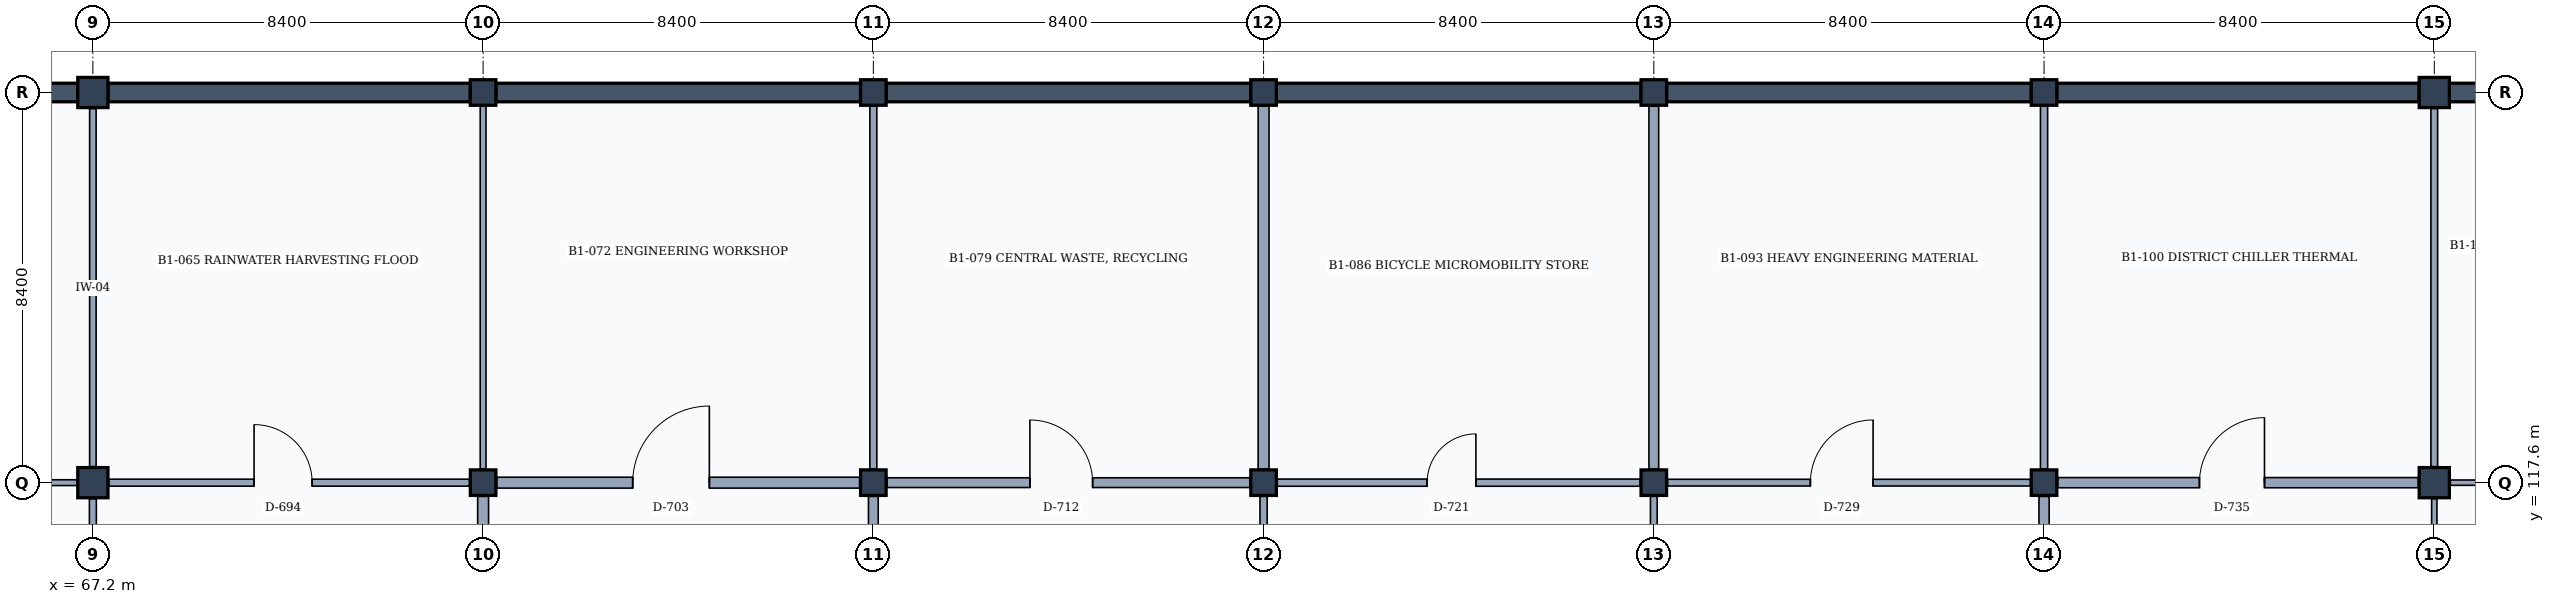
"""IFC4 building model, lengths in metres.
Left out: names, types, materials, properties, quantities, classifications, styles, units other than length and angle.
Written with IfcOpenShell. Run it as: python <this file> out.ifc"""

import sys

from ifc_helpers import new_model, si_unit, direction, frame, frame_2d, origin, origin_2d, place, context, subcontext, project, spatial, rectangle, extrude, element, fill, save


model = new_model("IFC4")
c1 = context("Model", 3, precision=1e-05, world=origin(), true_north=direction((0.0, 1.0)))
c2 = subcontext(c1, "Body", "Model", "MODEL_VIEW")
j1 = project(units=[si_unit("LENGTHUNIT", "METRE"), si_unit("PLANEANGLEUNIT", "RADIAN")], contexts=[c1])
p1 = place(None, origin())
s1 = spatial("IfcSite", under=j1, at=p1, CompositionType="ELEMENT")
p2 = place(p1, origin())
s2 = spatial("IfcBuilding", under=s1, at=p2, CompositionType="ELEMENT")
p3 = place(p2, frame((0.0, 0.0, -4.2)))
s3 = spatial("IfcBuildingStorey", under=s2, at=p3, CompositionType="ELEMENT", Elevation=-4.2)
for number, where, z_axis, x_axis in (
    (1, (67.2, 117.6, 0.0), (0.0, 0.0, 1.0), (1.0, 0.0, 0.0)),
    (2, (67.2, 126.0, 0.0), (0.0, 0.0, 1.0), (1.0, 0.0, 0.0)),
):
    element("IfcColumn", number, at=place(p3, frame(where, z_axis=z_axis, x_axis=x_axis)), inside=s3, PredefinedType="COLUMN", context=c2, shape_type="SweptSolid", body=[
        extrude(rectangle(XDim=0.65, YDim=0.65, at=origin_2d()), origin(), (0.0, 0.0, 1.0), 4.2),
    ])
for number, where, z_axis, x_axis in (
    (3, (75.6, 117.6, 0.0), (0.0, 0.0, 1.0), (1.0, 0.0, 0.0)),
    (4, (75.6, 126.0, 0.0), (0.0, 0.0, 1.0), (1.0, 0.0, 0.0)),
    (5, (84.0, 117.6, 0.0), (0.0, 0.0, 1.0), (1.0, 0.0, 0.0)),
    (6, (84.0, 126.0, 0.0), (0.0, 0.0, 1.0), (1.0, 0.0, 0.0)),
    (7, (92.4, 117.6, 0.0), (0.0, 0.0, 1.0), (1.0, 0.0, 0.0)),
    (8, (92.4, 126.0, 0.0), (0.0, 0.0, 1.0), (1.0, 0.0, 0.0)),
    (9, (100.8, 117.6, 0.0), (0.0, 0.0, 1.0), (1.0, 0.0, 0.0)),
    (10, (100.8, 126.0, 0.0), (0.0, 0.0, 1.0), (1.0, 0.0, 0.0)),
    (11, (109.2, 117.6, 0.0), (0.0, 0.0, 1.0), (1.0, 0.0, 0.0)),
    (12, (109.2, 126.0, 0.0), (0.0, 0.0, 1.0), (1.0, 0.0, 0.0)),
):
    element("IfcColumn", number, at=place(p3, frame(where, z_axis=z_axis, x_axis=x_axis)), inside=s3, PredefinedType="COLUMN", context=c2, shape_type="SweptSolid", body=[
        extrude(rectangle(XDim=0.55, YDim=0.55, at=origin_2d()), origin(), (0.0, 0.0, 1.0), 4.2),
    ])
for number, where, z_axis, x_axis in (
    (13, (117.6, 117.6, 0.0), (0.0, 0.0, 1.0), (1.0, 0.0, 0.0)),
    (14, (117.6, 126.0, 0.0), (0.0, 0.0, 1.0), (1.0, 0.0, 0.0)),
):
    element("IfcColumn", number, at=place(p3, frame(where, z_axis=z_axis, x_axis=x_axis)), inside=s3, PredefinedType="COLUMN", context=c2, shape_type="SweptSolid", body=[
        extrude(rectangle(XDim=0.65, YDim=0.65, at=origin_2d()), origin(), (0.0, 0.0, 1.0), 4.2),
    ])
p4 = place(p3, frame((59.125, 126.0, 0.0), z_axis=(0.0, 0.0, 1.0), x_axis=(1.0, 0.0, 0.0)))
e15 = element("IfcWall", 15, at=p4, inside=s3, PredefinedType="STANDARD", context=c2, shape_type="SweptSolid", body=[
    extrude(rectangle(XDim=7.75, YDim=0.4, at=frame_2d((3.875, 0.0))), origin(), (0.0, 0.0, 1.0), 3.88),
])
p5 = place(p3, frame((67.525, 126.0, 0.0), z_axis=(0.0, 0.0, 1.0), x_axis=(1.0, 0.0, 0.0)))
e16 = element("IfcWall", 16, at=p5, inside=s3, PredefinedType="STANDARD", context=c2, shape_type="SweptSolid", body=[
    extrude(rectangle(XDim=7.8, YDim=0.4, at=frame_2d((3.9, 0.0))), origin(), (0.0, 0.0, 1.0), 3.88),
])
for number, where, z_axis, x_axis in (
    (17, (75.875, 126.0, 0.0), (0.0, 0.0, 1.0), (1.0, 0.0, 0.0)),
    (18, (84.275, 126.0, 0.0), (0.0, 0.0, 1.0), (1.0, 0.0, 0.0)),
):
    element("IfcWall", number, at=place(p3, frame(where, z_axis=z_axis, x_axis=x_axis)), inside=s3, PredefinedType="STANDARD", context=c2, shape_type="SweptSolid", body=[
        extrude(rectangle(XDim=7.85, YDim=0.4, at=frame_2d((3.925, 0.0))), origin(), (0.0, 0.0, 1.0), 3.88),
    ])
p6 = place(p3, frame((92.675, 126.0, 0.0), z_axis=(0.0, 0.0, 1.0), x_axis=(1.0, 0.0, 0.0)))
e19 = element("IfcWall", 19, at=p6, inside=s3, PredefinedType="STANDARD", context=c2, shape_type="SweptSolid", body=[
    extrude(rectangle(XDim=7.85, YDim=0.4, at=frame_2d((3.925, 0.0))), origin(), (0.0, 0.0, 1.0), 3.88),
])
p7 = place(p3, frame((101.075, 126.0, 0.0), z_axis=(0.0, 0.0, 1.0), x_axis=(1.0, 0.0, 0.0)))
e20 = element("IfcWall", 20, at=p7, inside=s3, PredefinedType="STANDARD", context=c2, shape_type="SweptSolid", body=[
    extrude(rectangle(XDim=7.85, YDim=0.4, at=frame_2d((3.925, 0.0))), origin(), (0.0, 0.0, 1.0), 3.88),
])
p8 = place(p3, frame((109.475, 126.0, 0.0), z_axis=(0.0, 0.0, 1.0), x_axis=(1.0, 0.0, 0.0)))
e21 = element("IfcWall", 21, at=p8, inside=s3, PredefinedType="STANDARD", context=c2, shape_type="SweptSolid", body=[
    extrude(rectangle(XDim=7.8, YDim=0.4, at=frame_2d((3.9, 0.0))), origin(), (0.0, 0.0, 1.0), 3.88),
])
p9 = place(p3, frame((117.925, 126.0, 0.0), z_axis=(0.0, 0.0, 1.0), x_axis=(1.0, 0.0, 0.0)))
e22 = element("IfcWall", 22, at=p9, inside=s3, PredefinedType="STANDARD", context=c2, shape_type="SweptSolid", body=[
    extrude(rectangle(XDim=7.75, YDim=0.4, at=frame_2d((3.875, 0.0))), origin(), (0.0, 0.0, 1.0), 3.88),
])
p10 = place(p3, frame((67.2, 109.545, 0.0), z_axis=(0.0, 0.0, 1.0), x_axis=(0.0, 1.0, 0.0)))
e23 = element("IfcWall", 23, at=p10, inside=s3, PredefinedType="PARTITIONING", context=c2, shape_type="SweptSolid", body=[
    extrude(rectangle(XDim=7.71, YDim=0.15, at=frame_2d((3.855, 0.0))), origin(), (0.0, 0.0, 1.0), 3.23),
])
p11 = place(p3, frame((59.145, 117.6, 0.0), z_axis=(0.0, 0.0, 1.0), x_axis=(1.0, 0.0, 0.0)))
e24 = element("IfcWall", 24, at=p11, inside=s3, PredefinedType="PARTITIONING", context=c2, shape_type="SweptSolid", body=[
    extrude(rectangle(XDim=7.71, YDim=0.125, at=frame_2d((3.855, 0.0))), origin(), (0.0, 0.0, 1.0), 2.93),
])
p12 = place(p11, frame((3.0, 0.0, 0.0)))
e25 = element("IfcOpeningElement", 25, at=p12, cuts=e24, PredefinedType="OPENING", context=c2, shape_type="SweptSolid", body=[
    extrude(rectangle(XDim=1.5, YDim=2.3, at=frame_2d((0.75, 1.15))), frame((0.0, 0.073, 0.0), z_axis=(0.0, -1.0, 0.0), x_axis=(1.0, 0.0, 0.0)), (0.0, 0.0, 1.0), 0.145),
])
p13 = place(p3, frame((67.2, 117.945, 0.0), z_axis=(0.0, 0.0, 1.0), x_axis=(0.0, 1.0, 0.0)))
e26 = element("IfcWall", 26, at=p13, inside=s3, PredefinedType="PARTITIONING", context=c2, shape_type="SweptSolid", body=[
    extrude(rectangle(XDim=7.71, YDim=0.14, at=frame_2d((3.855, 0.0))), origin(), (0.0, 0.0, 1.0), 3.23),
])
p14 = place(p3, frame((75.6, 109.495, 0.0), z_axis=(0.0, 0.0, 1.0), x_axis=(0.0, 1.0, 0.0)))
e27 = element("IfcWall", 27, at=p14, inside=s3, PredefinedType="PARTITIONING", context=c2, shape_type="SweptSolid", body=[
    extrude(rectangle(XDim=7.81, YDim=0.235, at=frame_2d((3.905, 0.0))), origin(), (0.0, 0.0, 1.0), 3.23),
])
p15 = place(p3, frame((67.545, 117.6, 0.0), z_axis=(0.0, 0.0, 1.0), x_axis=(1.0, 0.0, 0.0)))
e28 = element("IfcWall", 28, at=p15, inside=s3, PredefinedType="PARTITIONING", context=c2, shape_type="SweptSolid", body=[
    extrude(rectangle(XDim=7.76, YDim=0.15, at=frame_2d((3.88, 0.0))), origin(), (0.0, 0.0, 1.0), 2.93),
])
p16 = place(p15, frame((3.125, 0.0, 0.0)))
e29 = element("IfcOpeningElement", 29, at=p16, cuts=e28, PredefinedType="OPENING", context=c2, shape_type="SweptSolid", body=[
    extrude(rectangle(XDim=1.25, YDim=2.3, at=frame_2d((0.625, 1.15))), frame((0.0, 0.085, 0.0), z_axis=(0.0, -1.0, 0.0), x_axis=(1.0, 0.0, 0.0)), (0.0, 0.0, 1.0), 0.17),
])
p17 = place(p3, frame((75.6, 117.895, 0.0), z_axis=(0.0, 0.0, 1.0), x_axis=(0.0, 1.0, 0.0)))
e30 = element("IfcWall", 30, at=p17, inside=s3, PredefinedType="PARTITIONING", context=c2, shape_type="SweptSolid", body=[
    extrude(rectangle(XDim=7.81, YDim=0.125, at=frame_2d((3.905, 0.0))), origin(), (0.0, 0.0, 1.0), 3.23),
])
p18 = place(p3, frame((84.0, 109.495, 0.0), z_axis=(0.0, 0.0, 1.0), x_axis=(0.0, 1.0, 0.0)))
e31 = element("IfcWall", 31, at=p18, inside=s3, PredefinedType="PARTITIONING", context=c2, shape_type="SweptSolid", body=[
    extrude(rectangle(XDim=7.81, YDim=0.21, at=frame_2d((3.905, 0.0))), origin(), (0.0, 0.0, 1.0), 3.23),
])
p19 = place(p3, frame((75.895, 117.6, 0.0), z_axis=(0.0, 0.0, 1.0), x_axis=(1.0, 0.0, 0.0)))
e32 = element("IfcWall", 32, at=p19, inside=s3, PredefinedType="PARTITIONING", context=c2, shape_type="SweptSolid", body=[
    extrude(rectangle(XDim=7.81, YDim=0.235, at=frame_2d((3.905, 0.0))), origin(), (0.0, 0.0, 1.0), 2.93),
])
p20 = place(p19, frame((2.925, 0.0, 0.0)))
e33 = element("IfcOpeningElement", 33, at=p20, cuts=e32, PredefinedType="OPENING", context=c2, shape_type="SweptSolid", body=[
    extrude(rectangle(XDim=1.65, YDim=2.25, at=frame_2d((0.825, 1.125))), frame((0.0, 0.127, 0.0), z_axis=(0.0, -1.0, 0.0), x_axis=(1.0, 0.0, 0.0)), (0.0, 0.0, 1.0), 0.255),
])
p21 = place(p3, frame((84.0, 117.895, 0.0), z_axis=(0.0, 0.0, 1.0), x_axis=(0.0, 1.0, 0.0)))
e34 = element("IfcWall", 34, at=p21, inside=s3, PredefinedType="PARTITIONING", context=c2, shape_type="SweptSolid", body=[
    extrude(rectangle(XDim=7.81, YDim=0.15, at=frame_2d((3.905, 0.0))), origin(), (0.0, 0.0, 1.0), 3.23),
])
p22 = place(p3, frame((92.4, 109.495, 0.0), z_axis=(0.0, 0.0, 1.0), x_axis=(0.0, 1.0, 0.0)))
e35 = element("IfcWall", 35, at=p22, inside=s3, PredefinedType="PARTITIONING", context=c2, shape_type="SweptSolid", body=[
    extrude(rectangle(XDim=7.81, YDim=0.155, at=frame_2d((3.905, 0.0))), origin(), (0.0, 0.0, 1.0), 3.23),
])
p23 = place(p3, frame((84.295, 117.6, 0.0), z_axis=(0.0, 0.0, 1.0), x_axis=(1.0, 0.0, 0.0)))
e36 = element("IfcWall", 36, at=p23, inside=s3, PredefinedType="PARTITIONING", context=c2, shape_type="SweptSolid", body=[
    extrude(rectangle(XDim=7.81, YDim=0.21, at=frame_2d((3.905, 0.0))), origin(), (0.0, 0.0, 1.0), 2.93),
])
p24 = place(p23, frame((3.075, 0.0, 0.0)))
e37 = element("IfcOpeningElement", 37, at=p24, cuts=e36, PredefinedType="OPENING", context=c2, shape_type="SweptSolid", body=[
    extrude(rectangle(XDim=1.35, YDim=2.25, at=frame_2d((0.675, 1.125))), frame((0.0, 0.115, 0.0), z_axis=(0.0, -1.0, 0.0), x_axis=(1.0, 0.0, 0.0)), (0.0, 0.0, 1.0), 0.23),
])
p25 = place(p3, frame((92.4, 117.895, 0.0), z_axis=(0.0, 0.0, 1.0), x_axis=(0.0, 1.0, 0.0)))
e38 = element("IfcWall", 38, at=p25, inside=s3, PredefinedType="PARTITIONING", context=c2, shape_type="SweptSolid", body=[
    extrude(rectangle(XDim=7.81, YDim=0.235, at=frame_2d((3.905, 0.0))), origin(), (0.0, 0.0, 1.0), 3.23),
])
p26 = place(p3, frame((100.8, 109.495, 0.0), z_axis=(0.0, 0.0, 1.0), x_axis=(0.0, 1.0, 0.0)))
e39 = element("IfcWall", 39, at=p26, inside=s3, PredefinedType="PARTITIONING", context=c2, shape_type="SweptSolid", body=[
    extrude(rectangle(XDim=7.81, YDim=0.145, at=frame_2d((3.905, 0.0))), origin(), (0.0, 0.0, 1.0), 3.23),
])
p27 = place(p3, frame((92.695, 117.6, 0.0), z_axis=(0.0, 0.0, 1.0), x_axis=(1.0, 0.0, 0.0)))
e40 = element("IfcWall", 40, at=p27, inside=s3, PredefinedType="PARTITIONING", context=c2, shape_type="SweptSolid", body=[
    extrude(rectangle(XDim=7.81, YDim=0.155, at=frame_2d((3.905, 0.0))), origin(), (0.0, 0.0, 1.0), 2.93),
])
p28 = place(p27, frame((3.225, 0.0, 0.0)))
e41 = element("IfcOpeningElement", 41, at=p28, cuts=e40, PredefinedType="OPENING", context=c2, shape_type="SweptSolid", body=[
    extrude(rectangle(XDim=1.05, YDim=2.2, at=frame_2d((0.525, 1.1))), frame((0.0, 0.087, 0.0), z_axis=(0.0, -1.0, 0.0), x_axis=(1.0, 0.0, 0.0)), (0.0, 0.0, 1.0), 0.175),
])
p29 = place(p3, frame((100.8, 117.895, 0.0), z_axis=(0.0, 0.0, 1.0), x_axis=(0.0, 1.0, 0.0)))
e42 = element("IfcWall", 42, at=p29, inside=s3, PredefinedType="PARTITIONING", context=c2, shape_type="SweptSolid", body=[
    extrude(rectangle(XDim=7.81, YDim=0.21, at=frame_2d((3.905, 0.0))), origin(), (0.0, 0.0, 1.0), 3.23),
])
p30 = place(p3, frame((109.2, 109.495, 0.0), z_axis=(0.0, 0.0, 1.0), x_axis=(0.0, 1.0, 0.0)))
e43 = element("IfcWall", 43, at=p30, inside=s3, PredefinedType="PARTITIONING", context=c2, shape_type="SweptSolid", body=[
    extrude(rectangle(XDim=7.81, YDim=0.22, at=frame_2d((3.905, 0.0))), origin(), (0.0, 0.0, 1.0), 3.23),
])
p31 = place(p3, frame((101.095, 117.6, 0.0), z_axis=(0.0, 0.0, 1.0), x_axis=(1.0, 0.0, 0.0)))
e44 = element("IfcWall", 44, at=p31, inside=s3, PredefinedType="PARTITIONING", context=c2, shape_type="SweptSolid", body=[
    extrude(rectangle(XDim=7.81, YDim=0.145, at=frame_2d((3.905, 0.0))), origin(), (0.0, 0.0, 1.0), 2.93),
])
p32 = place(p31, frame((3.075, 0.0, 0.0)))
e45 = element("IfcOpeningElement", 45, at=p32, cuts=e44, PredefinedType="OPENING", context=c2, shape_type="SweptSolid", body=[
    extrude(rectangle(XDim=1.35, YDim=2.25, at=frame_2d((0.675, 1.125))), frame((0.0, 0.083, 0.0), z_axis=(0.0, -1.0, 0.0), x_axis=(1.0, 0.0, 0.0)), (0.0, 0.0, 1.0), 0.165),
])
p33 = place(p3, frame((109.2, 117.895, 0.0), z_axis=(0.0, 0.0, 1.0), x_axis=(0.0, 1.0, 0.0)))
e46 = element("IfcWall", 46, at=p33, inside=s3, PredefinedType="PARTITIONING", context=c2, shape_type="SweptSolid", body=[
    extrude(rectangle(XDim=7.81, YDim=0.155, at=frame_2d((3.905, 0.0))), origin(), (0.0, 0.0, 1.0), 3.23),
])
p34 = place(p3, frame((117.6, 109.545, 0.0), z_axis=(0.0, 0.0, 1.0), x_axis=(0.0, 1.0, 0.0)))
e47 = element("IfcWall", 47, at=p34, inside=s3, PredefinedType="PARTITIONING", context=c2, shape_type="SweptSolid", body=[
    extrude(rectangle(XDim=7.71, YDim=0.115, at=frame_2d((3.855, 0.0))), origin(), (0.0, 0.0, 1.0), 3.23),
])
p35 = place(p3, frame((109.495, 117.6, 0.0), z_axis=(0.0, 0.0, 1.0), x_axis=(1.0, 0.0, 0.0)))
e48 = element("IfcWall", 48, at=p35, inside=s3, PredefinedType="PARTITIONING", context=c2, shape_type="SweptSolid", body=[
    extrude(rectangle(XDim=7.76, YDim=0.22, at=frame_2d((3.88, 0.0))), origin(), (0.0, 0.0, 1.0), 2.93),
])
p36 = place(p35, frame((3.05, 0.0, 0.0)))
e49 = element("IfcOpeningElement", 49, at=p36, cuts=e48, PredefinedType="OPENING", context=c2, shape_type="SweptSolid", body=[
    extrude(rectangle(XDim=1.4, YDim=2.25, at=frame_2d((0.7, 1.125))), frame((0.0, 0.12, 0.0), z_axis=(0.0, -1.0, 0.0), x_axis=(1.0, 0.0, 0.0)), (0.0, 0.0, 1.0), 0.24),
])
p37 = place(p3, frame((117.6, 117.945, 0.0), z_axis=(0.0, 0.0, 1.0), x_axis=(0.0, 1.0, 0.0)))
e50 = element("IfcWall", 50, at=p37, inside=s3, PredefinedType="PARTITIONING", context=c2, shape_type="SweptSolid", body=[
    extrude(rectangle(XDim=7.71, YDim=0.145, at=frame_2d((3.855, 0.0))), origin(), (0.0, 0.0, 1.0), 3.23),
])
p38 = place(p3, frame((117.945, 117.6, 0.0), z_axis=(0.0, 0.0, 1.0), x_axis=(1.0, 0.0, 0.0)))
e51 = element("IfcWall", 51, at=p38, inside=s3, PredefinedType="PARTITIONING", context=c2, shape_type="SweptSolid", body=[
    extrude(rectangle(XDim=7.71, YDim=0.115, at=frame_2d((3.855, 0.0))), origin(), (0.0, 0.0, 1.0), 2.93),
])
p39 = place(p38, frame((2.8, 0.0, 0.0)))
e52 = element("IfcOpeningElement", 52, at=p39, cuts=e51, PredefinedType="OPENING", context=c2, shape_type="SweptSolid", body=[
    extrude(rectangle(XDim=1.9, YDim=2.4, at=frame_2d((0.95, 1.2))), frame((0.0, 0.067, 0.0), z_axis=(0.0, -1.0, 0.0), x_axis=(1.0, 0.0, 0.0)), (0.0, 0.0, 1.0), 0.135),
])
p40 = place(p16, origin())
e53 = element("IfcDoor", 53, at=p40, inside=s3, OperationType="SINGLE_SWING_LEFT", PredefinedType="DOOR", context=c2, shape_type="SweptSolid", body=[
    extrude(rectangle(XDim=1.25, YDim=2.3, at=frame_2d((0.625, 1.15))), frame((0.0, 0.025, 0.0), z_axis=(0.0, -1.0, 0.0), x_axis=(1.0, 0.0, 0.0)), (0.0, 0.0, 1.0), 0.05),
])
fill(e29, e53)
p41 = place(p20, origin())
e54 = element("IfcDoor", 54, at=p41, inside=s3, OperationType="SINGLE_SWING_RIGHT", PredefinedType="DOOR", context=c2, shape_type="SweptSolid", body=[
    extrude(rectangle(XDim=1.65, YDim=2.25, at=frame_2d((0.825, 1.125))), frame((0.0, 0.025, 0.0), z_axis=(0.0, -1.0, 0.0), x_axis=(1.0, 0.0, 0.0)), (0.0, 0.0, 1.0), 0.05),
])
fill(e33, e54)
p42 = place(p24, origin())
e55 = element("IfcDoor", 55, at=p42, inside=s3, OperationType="SINGLE_SWING_LEFT", PredefinedType="DOOR", context=c2, shape_type="SweptSolid", body=[
    extrude(rectangle(XDim=1.35, YDim=2.25, at=frame_2d((0.675, 1.125))), frame((0.0, 0.025, 0.0), z_axis=(0.0, -1.0, 0.0), x_axis=(1.0, 0.0, 0.0)), (0.0, 0.0, 1.0), 0.05),
])
fill(e37, e55)
p43 = place(p28, origin())
e56 = element("IfcDoor", 56, at=p43, inside=s3, OperationType="SINGLE_SWING_RIGHT", PredefinedType="DOOR", context=c2, shape_type="SweptSolid", body=[
    extrude(rectangle(XDim=1.05, YDim=2.2, at=frame_2d((0.525, 1.1))), frame((0.0, 0.025, 0.0), z_axis=(0.0, -1.0, 0.0), x_axis=(1.0, 0.0, 0.0)), (0.0, 0.0, 1.0), 0.05),
])
fill(e41, e56)
p44 = place(p32, origin())
e57 = element("IfcDoor", 57, at=p44, inside=s3, OperationType="SINGLE_SWING_RIGHT", PredefinedType="DOOR", context=c2, shape_type="SweptSolid", body=[
    extrude(rectangle(XDim=1.35, YDim=2.25, at=frame_2d((0.675, 1.125))), frame((0.0, 0.025, 0.0), z_axis=(0.0, -1.0, 0.0), x_axis=(1.0, 0.0, 0.0)), (0.0, 0.0, 1.0), 0.05),
])
fill(e45, e57)
p45 = place(p36, origin())
e58 = element("IfcDoor", 58, at=p45, inside=s3, OperationType="SINGLE_SWING_RIGHT", PredefinedType="DOOR", context=c2, shape_type="SweptSolid", body=[
    extrude(rectangle(XDim=1.4, YDim=2.25, at=frame_2d((0.7, 1.125))), frame((0.0, 0.025, 0.0), z_axis=(0.0, -1.0, 0.0), x_axis=(1.0, 0.0, 0.0)), (0.0, 0.0, 1.0), 0.05),
])
fill(e49, e58)
save(model, sys.argv[1])
